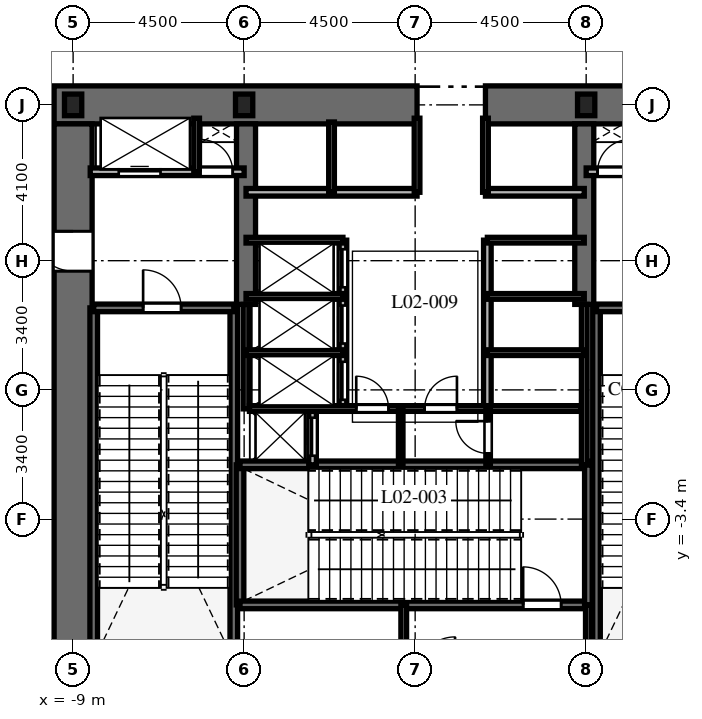
"""IFC4 building model, lengths in metres.
Left out: names, types, materials, properties, quantities, classifications, styles, units other than length and angle.
Written with IfcOpenShell. Run it as: python <this file> out.ifc"""

import sys

from ifc_helpers import new_model, si_unit, direction, frame, frame_2d, origin, origin_2d, place, context, subcontext, project, spatial, rectangle, i_section, extrude, element, fill, save


model = new_model("IFC4")
c1 = context("Model", 3, precision=1e-05, world=origin(), true_north=direction((0.0, 1.0)))
c2 = subcontext(c1, "Body", "Model", "MODEL_VIEW")
j1 = project(units=[si_unit("LENGTHUNIT", "METRE"), si_unit("PLANEANGLEUNIT", "RADIAN")], contexts=[c1])
p1 = place(None, origin())
s1 = spatial("IfcSite", under=j1, at=p1, CompositionType="ELEMENT")
p2 = place(p1, origin())
s2 = spatial("IfcBuilding", under=s1, at=p2, CompositionType="ELEMENT")
p3 = place(p2, frame((0.0, 0.0, 11.4)))
s3 = spatial("IfcBuildingStorey", under=s2, at=p3, CompositionType="ELEMENT", Elevation=11.4)
p4 = place(p3, frame((-9.5, 7.5, 0.0), z_axis=(0.0, 0.0, 1.0), x_axis=(1.0, 0.0, 0.0)))
e1 = element("IfcWall", 1, at=p4, inside=s3, PredefinedType="SHEAR", context=c2, shape_type="SweptSolid", body=[
    extrude(rectangle(XDim=9.55, YDim=1.0, at=frame_2d((4.775, 0.0))), origin(), (0.0, 0.0, 1.0), 7.2),
])
p5 = place(p3, frame((1.85, 7.5, 0.0), z_axis=(0.0, 0.0, 1.0), x_axis=(1.0, 0.0, 0.0)))
e2 = element("IfcWall", 2, at=p5, inside=s3, PredefinedType="SHEAR", context=c2, shape_type="SweptSolid", body=[
    extrude(rectangle(XDim=7.65, YDim=1.0, at=frame_2d((3.825, 0.0))), origin(), (0.0, 0.0, 1.0), 7.2),
])
p6 = place(p3, frame((-9.0, -7.0, 0.0), z_axis=(0.0, 0.0, 1.0), x_axis=(0.0, 1.0, 0.0)))
e3 = element("IfcWall", 3, at=p6, inside=s3, PredefinedType="SHEAR", context=c2, shape_type="SweptSolid", body=[
    extrude(rectangle(XDim=14.0, YDim=1.0, at=frame_2d((7.0, 0.0))), origin(), (0.0, 0.0, 1.0), 7.2),
])
p7 = place(p6, frame((10.125, 0.0, 0.0)))
e4 = element("IfcOpeningElement", 4, at=p7, cuts=e3, PredefinedType="OPENING", context=c2, shape_type="SweptSolid", body=[
    extrude(rectangle(XDim=1.05, YDim=2.15, at=frame_2d((0.525, 1.075))), frame((0.0, 0.51, 0.0), z_axis=(0.0, -1.0, 0.0), x_axis=(1.0, 0.0, 0.0)), (0.0, 0.0, 1.0), 1.02),
])
for number, where, z_axis, x_axis in (
    (5, (-4.45, 2.25, 0.0), (0.0, 0.0, 1.0), (0.0, 1.0, 0.0)),
    (6, (4.45, 2.25, 0.0), (0.0, 0.0, 1.0), (0.0, 1.0, 0.0)),
):
    element("IfcWall", number, at=place(p3, frame(where, z_axis=z_axis, x_axis=x_axis)), inside=s3, PredefinedType="SHEAR", context=c2, shape_type="SweptSolid", body=[
        extrude(rectangle(XDim=4.75, YDim=0.5, at=frame_2d((2.375, 0.0))), origin(), (0.0, 0.0, 1.0), 7.2),
    ])
for number, where, z_axis, x_axis in (
    (7, (-8.458, -6.985, 0.0), (0.0, 0.0, 1.0), (0.0, 1.0, 0.0)),
    (8, (-4.772, -6.985, 0.0), (0.0, 0.0, 1.0), (0.0, 1.0, 0.0)),
):
    element("IfcWall", number, at=place(p3, frame(where, z_axis=z_axis, x_axis=x_axis)), inside=s3, PredefinedType="SHEAR", context=c2, shape_type="SweptSolid", body=[
        extrude(rectangle(XDim=9.143, YDim=0.2, at=frame_2d((4.572, 0.0))), origin(), (0.0, 0.0, 1.0), 7.2),
    ])
p8 = place(p3, frame((-8.458, 2.158, 0.0), z_axis=(0.0, 0.0, 1.0), x_axis=(1.0, 0.0, 0.0)))
e9 = element("IfcWall", 9, at=p8, inside=s3, PredefinedType="SHEAR", context=c2, shape_type="SweptSolid", body=[
    extrude(rectangle(XDim=3.686, YDim=0.2, at=frame_2d((1.843, 0.0))), origin(), (0.0, 0.0, 1.0), 7.2),
])
p9 = place(p8, frame((1.3, 0.0, 0.0)))
e10 = element("IfcOpeningElement", 10, at=p9, cuts=e9, PredefinedType="OPENING", context=c2, shape_type="SweptSolid", body=[
    extrude(rectangle(XDim=1.0, YDim=2.15, at=frame_2d((0.5, 1.075))), frame((0.0, 0.11, 0.0), z_axis=(0.0, -1.0, 0.0), x_axis=(1.0, 0.0, 0.0)), (0.0, 0.0, 1.0), 0.22),
])
p10 = place(p3, frame((4.772, -6.985, 0.0), z_axis=(0.0, 0.0, 1.0), x_axis=(0.0, 1.0, 0.0)))
e11 = element("IfcWall", 11, at=p10, inside=s3, PredefinedType="SHEAR", context=c2, shape_type="SweptSolid", body=[
    extrude(rectangle(XDim=9.143, YDim=0.2, at=frame_2d((4.572, 0.0))), origin(), (0.0, 0.0, 1.0), 7.2),
])
p11 = place(p3, frame((4.772, 2.158, 0.0), z_axis=(0.0, 0.0, 1.0), x_axis=(1.0, 0.0, 0.0)))
e12 = element("IfcWall", 12, at=p11, inside=s3, PredefinedType="SHEAR", context=c2, shape_type="SweptSolid", body=[
    extrude(rectangle(XDim=3.686, YDim=0.2, at=frame_2d((1.843, 0.0))), origin(), (0.0, 0.0, 1.0), 7.2),
])
p12 = place(p11, frame((1.35, 0.0, 0.0)))
e13 = element("IfcOpeningElement", 13, at=p12, cuts=e12, PredefinedType="OPENING", context=c2, shape_type="SweptSolid", body=[
    extrude(rectangle(XDim=1.0, YDim=2.15, at=frame_2d((0.5, 1.075))), frame((0.0, 0.11, 0.0), z_axis=(0.0, -1.0, 0.0), x_axis=(1.0, 0.0, 0.0)), (0.0, 0.0, 1.0), 0.22),
])
p13 = place(p3, frame((-4.608, -5.658, 0.0), z_axis=(0.0, 0.0, 1.0), x_axis=(0.0, 1.0, 0.0)))
e14 = element("IfcWall", 14, at=p13, inside=s3, PredefinedType="SHEAR", context=c2, shape_type="SweptSolid", body=[
    extrude(rectangle(XDim=3.686, YDim=0.2, at=frame_2d((1.843, 0.0))), origin(), (0.0, 0.0, 1.0), 7.2),
])
p14 = place(p3, frame((-4.608, -5.658, 0.0), z_axis=(0.0, 0.0, 1.0), x_axis=(1.0, 0.0, 0.0)))
e15 = element("IfcWall", 15, at=p14, inside=s3, PredefinedType="SHEAR", context=c2, shape_type="SweptSolid", body=[
    extrude(rectangle(XDim=9.166, YDim=0.2, at=frame_2d((4.583, 0.0))), origin(), (0.0, 0.0, 1.0), 7.2),
])
p15 = place(p14, frame((7.45, 0.0, 0.0)))
e16 = element("IfcOpeningElement", 16, at=p15, cuts=e15, PredefinedType="OPENING", context=c2, shape_type="SweptSolid", body=[
    extrude(rectangle(XDim=1.0, YDim=2.15, at=frame_2d((0.5, 1.075))), frame((0.0, 0.11, 0.0), z_axis=(0.0, -1.0, 0.0), x_axis=(1.0, 0.0, 0.0)), (0.0, 0.0, 1.0), 0.22),
])
p16 = place(p3, frame((-4.608, -1.972, 0.0), z_axis=(0.0, 0.0, 1.0), x_axis=(1.0, 0.0, 0.0)))
e17 = element("IfcWall", 17, at=p16, inside=s3, PredefinedType="SHEAR", context=c2, shape_type="SweptSolid", body=[
    extrude(rectangle(XDim=9.166, YDim=0.2, at=frame_2d((4.583, 0.0))), origin(), (0.0, 0.0, 1.0), 7.2),
])
p17 = place(p3, frame((4.558, -5.658, 0.0), z_axis=(0.0, 0.0, 1.0), x_axis=(0.0, 1.0, 0.0)))
e18 = element("IfcWall", 18, at=p17, inside=s3, PredefinedType="SHEAR", context=c2, shape_type="SweptSolid", body=[
    extrude(rectangle(XDim=3.686, YDim=0.2, at=frame_2d((1.843, 0.0))), origin(), (0.0, 0.0, 1.0), 7.2),
])
for number, where, z_axis, x_axis in (
    (19, (4.5, 7.5, 0.0), (0.0, 0.0, 1.0), (1.0, 0.0, 0.0)),
    (20, (-4.5, 7.5, 0.0), (0.0, 0.0, 1.0), (1.0, 0.0, 0.0)),
    (21, (-9.0, 7.5, 0.0), (0.0, 0.0, 1.0), (1.0, 0.0, 0.0)),
):
    element("IfcColumn", number, at=place(p3, frame(where, z_axis=z_axis, x_axis=x_axis)), inside=s3, PredefinedType="COLUMN", context=c2, shape_type="SweptSolid", body=[
        extrude(i_section(OverallWidth=0.454, OverallDepth=0.569, WebThickness=0.078, FlangeThickness=0.125, at=origin_2d()), origin(), (0.0, 0.0, 1.0), 7.2),
    ])
for number, where, z_axis, x_axis in (
    (22, (-0.3, -7.02, 0.0), (0.0, 0.0, 1.0), (0.0, 1.0, 0.0)),
    (23, (4.558, -7.02, 0.0), (0.0, 0.0, 1.0), (0.0, 1.0, 0.0)),
):
    element("IfcWall", number, at=place(p3, frame(where, z_axis=z_axis, x_axis=x_axis)), inside=s3, PredefinedType="PARTITIONING", context=c2, shape_type="SweptSolid", body=[
        extrude(rectangle(XDim=1.362, YDim=0.15, at=frame_2d((0.681, 0.0))), origin(), (0.0, 0.0, 1.0), 6.88),
    ])
p18 = place(p3, frame((-8.55, 5.74, 0.0), z_axis=(0.0, 0.0, 1.0), x_axis=(1.0, 0.0, 0.0)))
e24 = element("IfcWall", 24, at=p18, inside=s3, PredefinedType="PARTITIONING", context=c2, shape_type="SweptSolid", body=[
    extrude(rectangle(XDim=4.05, YDim=0.2, at=frame_2d((2.025, 0.0))), origin(), (0.0, 0.0, 1.0), 6.88),
])
p19 = place(p18, frame((0.75, 0.0, 0.0)))
e25 = element("IfcOpeningElement", 25, at=p19, cuts=e24, PredefinedType="OPENING", context=c2, shape_type="SweptSolid", body=[
    extrude(rectangle(XDim=1.1, YDim=2.2, at=frame_2d((0.55, 1.1))), frame((0.0, 0.11, 0.0), z_axis=(0.0, -1.0, 0.0), x_axis=(1.0, 0.0, 0.0)), (0.0, 0.0, 1.0), 0.22),
])
p20 = place(p18, frame((2.9, 0.0, 0.0)))
e26 = element("IfcOpeningElement", 26, at=p20, cuts=e24, PredefinedType="OPENING", context=c2, shape_type="SweptSolid", body=[
    extrude(rectangle(XDim=0.85, YDim=2.03, at=frame_2d((0.425, 1.015))), frame((0.0, 0.11, 0.0), z_axis=(0.0, -1.0, 0.0), x_axis=(1.0, 0.0, 0.0)), (0.0, 0.0, 1.0), 0.22),
])
p21 = place(p3, frame((-5.75, 5.74, 0.0), z_axis=(0.0, 0.0, 1.0), x_axis=(0.0, 1.0, 0.0)))
e27 = element("IfcWall", 27, at=p21, inside=s3, PredefinedType="PARTITIONING", context=c2, shape_type="SweptSolid", body=[
    extrude(rectangle(XDim=1.41, YDim=0.15, at=frame_2d((0.705, 0.0))), origin(), (0.0, 0.0, 1.0), 6.88),
])
p22 = place(p3, frame((4.5, 5.74, 0.0), z_axis=(0.0, 0.0, 1.0), x_axis=(1.0, 0.0, 0.0)))
e28 = element("IfcWall", 28, at=p22, inside=s3, PredefinedType="PARTITIONING", context=c2, shape_type="SweptSolid", body=[
    extrude(rectangle(XDim=4.05, YDim=0.2, at=frame_2d((2.025, 0.0))), origin(), (0.0, 0.0, 1.0), 6.88),
])
p23 = place(p22, frame((0.3, 0.0, 0.0)))
e29 = element("IfcOpeningElement", 29, at=p23, cuts=e28, PredefinedType="OPENING", context=c2, shape_type="SweptSolid", body=[
    extrude(rectangle(XDim=0.85, YDim=2.03, at=frame_2d((0.425, 1.015))), frame((0.0, 0.11, 0.0), z_axis=(0.0, -1.0, 0.0), x_axis=(1.0, 0.0, 0.0)), (0.0, 0.0, 1.0), 0.22),
])
p24 = place(p22, frame((2.15, 0.0, 0.0)))
e30 = element("IfcOpeningElement", 30, at=p24, cuts=e28, PredefinedType="OPENING", context=c2, shape_type="SweptSolid", body=[
    extrude(rectangle(XDim=1.1, YDim=2.2, at=frame_2d((0.55, 1.1))), frame((0.0, 0.11, 0.0), z_axis=(0.0, -1.0, 0.0), x_axis=(1.0, 0.0, 0.0)), (0.0, 0.0, 1.0), 0.22),
])
p25 = place(p3, frame((-2.7, -1.972, 0.0), z_axis=(0.0, 0.0, 1.0), x_axis=(0.0, 1.0, 0.0)))
e31 = element("IfcWall", 31, at=p25, inside=s3, PredefinedType="PARTITIONING", context=c2, shape_type="SweptSolid", body=[
    extrude(rectangle(XDim=1.472, YDim=0.2, at=frame_2d((0.736, 0.0))), origin(), (0.0, 0.0, 1.0), 6.88),
])
p26 = place(p25, frame((0.24, 0.0, 0.0)))
e32 = element("IfcOpeningElement", 32, at=p26, cuts=e31, PredefinedType="OPENING", context=c2, shape_type="SweptSolid", body=[
    extrude(rectangle(XDim=1.0, YDim=2.2, at=frame_2d((0.5, 1.1))), frame((0.0, 0.11, 0.0), z_axis=(0.0, -1.0, 0.0), x_axis=(1.0, 0.0, 0.0)), (0.0, 0.0, 1.0), 0.22),
])
p27 = place(p3, frame((-4.45, 5.2, 0.0), z_axis=(0.0, 0.0, 1.0), x_axis=(1.0, 0.0, 0.0)))
e33 = element("IfcWall", 33, at=p27, inside=s3, PredefinedType="PARTITIONING", context=c2, shape_type="SweptSolid", body=[
    extrude(rectangle(XDim=4.5, YDim=0.2, at=frame_2d((2.25, 0.0))), origin(), (0.0, 0.0, 1.0), 6.88),
])
p28 = place(p3, frame((1.85, 5.2, 0.0), z_axis=(0.0, 0.0, 1.0), x_axis=(1.0, 0.0, 0.0)))
e34 = element("IfcWall", 34, at=p28, inside=s3, PredefinedType="PARTITIONING", context=c2, shape_type="SweptSolid", body=[
    extrude(rectangle(XDim=2.6, YDim=0.2, at=frame_2d((1.3, 0.0))), origin(), (0.0, 0.0, 1.0), 6.88),
])
p29 = place(p3, frame((-2.2, 5.2, 0.0), z_axis=(0.0, 0.0, 1.0), x_axis=(0.0, 1.0, 0.0)))
e35 = element("IfcWall", 35, at=p29, inside=s3, PredefinedType="PARTITIONING", context=c2, shape_type="SweptSolid", body=[
    extrude(rectangle(XDim=1.85, YDim=0.15, at=frame_2d((0.925, 0.0))), origin(), (0.0, 0.0, 1.0), 6.88),
])
for number, where, z_axis, x_axis in (
    (36, (0.05, 5.2, 0.0), (0.0, 0.0, 1.0), (0.0, 1.0, 0.0)),
    (37, (1.85, 5.2, 0.0), (0.0, 0.0, 1.0), (0.0, 1.0, 0.0)),
):
    element("IfcWall", number, at=place(p3, frame(where, z_axis=z_axis, x_axis=x_axis)), inside=s3, PredefinedType="PARTITIONING", context=c2, shape_type="SweptSolid", body=[
        extrude(rectangle(XDim=1.95, YDim=0.15, at=frame_2d((0.975, 0.0))), origin(), (0.0, 0.0, 1.0), 6.88),
    ])
p30 = place(p3, frame((-4.45, -0.5, 0.0), z_axis=(0.0, 0.0, 1.0), x_axis=(0.0, 1.0, 0.0)))
e38 = element("IfcWall", 38, at=p30, inside=s3, PredefinedType="PARTITIONING", context=c2, shape_type="SweptSolid", body=[
    extrude(rectangle(XDim=2.75, YDim=0.15, at=frame_2d((1.375, 0.0))), origin(), (0.0, 0.0, 1.0), 6.88),
])
p31 = place(p3, frame((4.45, -1.972, 0.0), z_axis=(0.0, 0.0, 1.0), x_axis=(0.0, 1.0, 0.0)))
e39 = element("IfcWall", 39, at=p31, inside=s3, PredefinedType="PARTITIONING", context=c2, shape_type="SweptSolid", body=[
    extrude(rectangle(XDim=4.222, YDim=0.15, at=frame_2d((2.111, 0.0))), origin(), (0.0, 0.0, 1.0), 6.88),
])
p32 = place(p3, frame((-1.9, -0.5, 0.0), z_axis=(0.0, 0.0, 1.0), x_axis=(0.0, 1.0, 0.0)))
e40 = element("IfcWall", 40, at=p32, inside=s3, PredefinedType="PARTITIONING", context=c2, shape_type="SweptSolid", body=[
    extrude(rectangle(XDim=4.44, YDim=0.2, at=frame_2d((2.22, 0.0))), origin(), (0.0, 0.0, 1.0), 6.88),
])
p33 = place(p32, frame((0.24, 0.0, 0.0)))
e41 = element("IfcOpeningElement", 41, at=p33, cuts=e40, PredefinedType="OPENING", context=c2, shape_type="SweptSolid", body=[
    extrude(rectangle(XDim=1.0, YDim=2.2, at=frame_2d((0.5, 1.1))), frame((0.0, 0.11, 0.0), z_axis=(0.0, -1.0, 0.0), x_axis=(1.0, 0.0, 0.0)), (0.0, 0.0, 1.0), 0.22),
])
p34 = place(p32, frame((1.72, 0.0, 0.0)))
e42 = element("IfcOpeningElement", 42, at=p34, cuts=e40, PredefinedType="OPENING", context=c2, shape_type="SweptSolid", body=[
    extrude(rectangle(XDim=1.0, YDim=2.2, at=frame_2d((0.5, 1.1))), frame((0.0, 0.11, 0.0), z_axis=(0.0, -1.0, 0.0), x_axis=(1.0, 0.0, 0.0)), (0.0, 0.0, 1.0), 0.22),
])
p35 = place(p32, frame((3.2, 0.0, 0.0)))
e43 = element("IfcOpeningElement", 43, at=p35, cuts=e40, PredefinedType="OPENING", context=c2, shape_type="SweptSolid", body=[
    extrude(rectangle(XDim=1.0, YDim=2.2, at=frame_2d((0.5, 1.1))), frame((0.0, 0.11, 0.0), z_axis=(0.0, -1.0, 0.0), x_axis=(1.0, 0.0, 0.0)), (0.0, 0.0, 1.0), 0.22),
])
for number, where, z_axis, x_axis in (
    (44, (-4.45, 3.94, 0.0), (0.0, 0.0, 1.0), (1.0, 0.0, 0.0)),
    (45, (-4.45, 0.98, 0.0), (0.0, 0.0, 1.0), (1.0, 0.0, 0.0)),
    (46, (-4.45, 2.46, 0.0), (0.0, 0.0, 1.0), (1.0, 0.0, 0.0)),
):
    element("IfcWall", number, at=place(p3, frame(where, z_axis=z_axis, x_axis=x_axis)), inside=s3, PredefinedType="PARTITIONING", context=c2, shape_type="SweptSolid", body=[
        extrude(rectangle(XDim=2.55, YDim=0.15, at=frame_2d((1.275, 0.0))), origin(), (0.0, 0.0, 1.0), 6.88),
    ])
p36 = place(p3, frame((1.9, -0.5, 0.0), z_axis=(0.0, 0.0, 1.0), x_axis=(0.0, 1.0, 0.0)))
e47 = element("IfcWall", 47, at=p36, inside=s3, PredefinedType="PARTITIONING", context=c2, shape_type="SweptSolid", body=[
    extrude(rectangle(XDim=4.44, YDim=0.2, at=frame_2d((2.22, 0.0))), origin(), (0.0, 0.0, 1.0), 6.88),
])
for number, where, z_axis, x_axis in (
    (48, (1.9, 3.94, 0.0), (0.0, 0.0, 1.0), (1.0, 0.0, 0.0)),
    (49, (1.9, 0.98, 0.0), (0.0, 0.0, 1.0), (1.0, 0.0, 0.0)),
    (50, (1.9, 2.46, 0.0), (0.0, 0.0, 1.0), (1.0, 0.0, 0.0)),
):
    element("IfcWall", number, at=place(p3, frame(where, z_axis=z_axis, x_axis=x_axis)), inside=s3, PredefinedType="PARTITIONING", context=c2, shape_type="SweptSolid", body=[
        extrude(rectangle(XDim=2.55, YDim=0.15, at=frame_2d((1.275, 0.0))), origin(), (0.0, 0.0, 1.0), 6.88),
    ])
p37 = place(p3, frame((-4.36, -0.49, 0.0), z_axis=(0.0, 0.0, 1.0), x_axis=(1.0, 0.0, 0.0)))
e51 = element("IfcWall", 51, at=p37, inside=s3, PredefinedType="PARTITIONING", context=c2, shape_type="SweptSolid", body=[
    extrude(rectangle(XDim=8.72, YDim=0.15, at=frame_2d((4.36, 0.0))), origin(), (0.0, 0.0, 1.0), 6.88),
])
p38 = place(p37, frame((2.81, 0.0, 0.0)))
e52 = element("IfcOpeningElement", 52, at=p38, cuts=e51, PredefinedType="OPENING", context=c2, shape_type="SweptSolid", body=[
    extrude(rectangle(XDim=0.85, YDim=2.03, at=frame_2d((0.425, 1.015))), frame((0.0, 0.085, 0.0), z_axis=(0.0, -1.0, 0.0), x_axis=(1.0, 0.0, 0.0)), (0.0, 0.0, 1.0), 0.17),
])
p39 = place(p37, frame((4.61, 0.0, 0.0)))
e53 = element("IfcOpeningElement", 53, at=p39, cuts=e51, PredefinedType="OPENING", context=c2, shape_type="SweptSolid", body=[
    extrude(rectangle(XDim=0.85, YDim=2.03, at=frame_2d((0.425, 1.015))), frame((0.0, 0.085, 0.0), z_axis=(0.0, -1.0, 0.0), x_axis=(1.0, 0.0, 0.0)), (0.0, 0.0, 1.0), 0.17),
])
p40 = place(p3, frame((-0.38, -1.972, 0.0), z_axis=(0.0, 0.0, 1.0), x_axis=(0.0, 1.0, 0.0)))
e54 = element("IfcWall", 54, at=p40, inside=s3, PredefinedType="PARTITIONING", context=c2, shape_type="SweptSolid", body=[
    extrude(rectangle(XDim=1.472, YDim=0.12, at=frame_2d((0.736, 0.0))), origin(), (0.0, 0.0, 1.0), 6.88),
])
p41 = place(p3, frame((1.92, -1.972, 0.0), z_axis=(0.0, 0.0, 1.0), x_axis=(0.0, 1.0, 0.0)))
e55 = element("IfcWall", 55, at=p41, inside=s3, PredefinedType="PARTITIONING", context=c2, shape_type="SweptSolid", body=[
    extrude(rectangle(XDim=1.472, YDim=0.12, at=frame_2d((0.736, 0.0))), origin(), (0.0, 0.0, 1.0), 6.88),
])
p42 = place(p41, frame((0.3, 0.0, 0.0)))
e56 = element("IfcOpeningElement", 56, at=p42, cuts=e55, PredefinedType="OPENING", context=c2, shape_type="SweptSolid", body=[
    extrude(rectangle(XDim=0.85, YDim=2.03, at=frame_2d((0.425, 1.015))), frame((0.0, 0.07, 0.0), z_axis=(0.0, -1.0, 0.0), x_axis=(1.0, 0.0, 0.0)), (0.0, 0.0, 1.0), 0.14),
])
p43 = place(p9, origin())
e57 = element("IfcDoor", 57, at=p43, inside=s3, OperationType="SINGLE_SWING_LEFT", PredefinedType="DOOR", context=c2, shape_type="SweptSolid", body=[
    extrude(rectangle(XDim=1.0, YDim=2.15, at=frame_2d((0.5, 1.075))), frame((0.0, 0.025, 0.0), z_axis=(0.0, -1.0, 0.0), x_axis=(1.0, 0.0, 0.0)), (0.0, 0.0, 1.0), 0.05),
])
fill(e10, e57)
p44 = place(p15, origin())
e58 = element("IfcDoor", 58, at=p44, inside=s3, OperationType="SINGLE_SWING_LEFT", PredefinedType="DOOR", context=c2, shape_type="SweptSolid", body=[
    extrude(rectangle(XDim=1.0, YDim=2.15, at=frame_2d((0.5, 1.075))), frame((0.0, 0.025, 0.0), z_axis=(0.0, -1.0, 0.0), x_axis=(1.0, 0.0, 0.0)), (0.0, 0.0, 1.0), 0.05),
])
fill(e16, e58)
p45 = place(p7, origin())
e59 = element("IfcDoor", 59, at=p45, inside=s3, OperationType="SINGLE_SWING_RIGHT", PredefinedType="DOOR", context=c2, shape_type="SweptSolid", body=[
    extrude(rectangle(XDim=1.05, YDim=2.15, at=frame_2d((0.525, 1.075))), frame((0.0, 0.025, 0.0), z_axis=(0.0, -1.0, 0.0), x_axis=(1.0, 0.0, 0.0)), (0.0, 0.0, 1.0), 0.05),
])
fill(e4, e59)
p46 = place(p19, origin())
e60 = element("IfcDoor", 60, at=p46, inside=s3, OperationType="SLIDING_TO_LEFT", PredefinedType="DOOR", context=c2, shape_type="SweptSolid", body=[
    extrude(rectangle(XDim=1.1, YDim=2.2, at=frame_2d((0.55, 1.1))), frame((0.0, 0.025, 0.0), z_axis=(0.0, -1.0, 0.0), x_axis=(1.0, 0.0, 0.0)), (0.0, 0.0, 1.0), 0.05),
])
fill(e25, e60)
p47 = place(p20, origin())
e61 = element("IfcDoor", 61, at=p47, inside=s3, OperationType="SINGLE_SWING_LEFT", PredefinedType="DOOR", context=c2, shape_type="SweptSolid", body=[
    extrude(rectangle(XDim=0.85, YDim=2.03, at=frame_2d((0.425, 1.015))), frame((0.0, 0.025, 0.0), z_axis=(0.0, -1.0, 0.0), x_axis=(1.0, 0.0, 0.0)), (0.0, 0.0, 1.0), 0.05),
])
fill(e26, e61)
p48 = place(p23, origin())
e62 = element("IfcDoor", 62, at=p48, inside=s3, OperationType="SINGLE_SWING_RIGHT", PredefinedType="DOOR", context=c2, shape_type="SweptSolid", body=[
    extrude(rectangle(XDim=0.85, YDim=2.03, at=frame_2d((0.425, 1.015))), frame((0.0, 0.025, 0.0), z_axis=(0.0, -1.0, 0.0), x_axis=(1.0, 0.0, 0.0)), (0.0, 0.0, 1.0), 0.05),
])
fill(e29, e62)
p49 = place(p26, origin())
e63 = element("IfcDoor", 63, at=p49, inside=s3, OperationType="SLIDING_TO_LEFT", PredefinedType="DOOR", context=c2, shape_type="SweptSolid", body=[
    extrude(rectangle(XDim=1.0, YDim=2.2, at=frame_2d((0.5, 1.1))), frame((0.0, 0.025, 0.0), z_axis=(0.0, -1.0, 0.0), x_axis=(1.0, 0.0, 0.0)), (0.0, 0.0, 1.0), 0.05),
])
fill(e32, e63)
p50 = place(p33, origin())
e64 = element("IfcDoor", 64, at=p50, inside=s3, OperationType="SLIDING_TO_LEFT", PredefinedType="DOOR", context=c2, shape_type="SweptSolid", body=[
    extrude(rectangle(XDim=1.0, YDim=2.2, at=frame_2d((0.5, 1.1))), frame((0.0, 0.025, 0.0), z_axis=(0.0, -1.0, 0.0), x_axis=(1.0, 0.0, 0.0)), (0.0, 0.0, 1.0), 0.05),
])
fill(e41, e64)
p51 = place(p34, origin())
e65 = element("IfcDoor", 65, at=p51, inside=s3, OperationType="SLIDING_TO_LEFT", PredefinedType="DOOR", context=c2, shape_type="SweptSolid", body=[
    extrude(rectangle(XDim=1.0, YDim=2.2, at=frame_2d((0.5, 1.1))), frame((0.0, 0.025, 0.0), z_axis=(0.0, -1.0, 0.0), x_axis=(1.0, 0.0, 0.0)), (0.0, 0.0, 1.0), 0.05),
])
fill(e42, e65)
p52 = place(p35, origin())
e66 = element("IfcDoor", 66, at=p52, inside=s3, OperationType="SLIDING_TO_LEFT", PredefinedType="DOOR", context=c2, shape_type="SweptSolid", body=[
    extrude(rectangle(XDim=1.0, YDim=2.2, at=frame_2d((0.5, 1.1))), frame((0.0, 0.025, 0.0), z_axis=(0.0, -1.0, 0.0), x_axis=(1.0, 0.0, 0.0)), (0.0, 0.0, 1.0), 0.05),
])
fill(e43, e66)
p53 = place(p38, origin())
e67 = element("IfcDoor", 67, at=p53, inside=s3, OperationType="SINGLE_SWING_LEFT", PredefinedType="DOOR", context=c2, shape_type="SweptSolid", body=[
    extrude(rectangle(XDim=0.85, YDim=2.03, at=frame_2d((0.425, 1.015))), frame((0.0, 0.025, 0.0), z_axis=(0.0, -1.0, 0.0), x_axis=(1.0, 0.0, 0.0)), (0.0, 0.0, 1.0), 0.05),
])
fill(e52, e67)
p54 = place(p39, origin())
e68 = element("IfcDoor", 68, at=p54, inside=s3, OperationType="SINGLE_SWING_RIGHT", PredefinedType="DOOR", context=c2, shape_type="SweptSolid", body=[
    extrude(rectangle(XDim=0.85, YDim=2.03, at=frame_2d((0.425, 1.015))), frame((0.0, 0.025, 0.0), z_axis=(0.0, -1.0, 0.0), x_axis=(1.0, 0.0, 0.0)), (0.0, 0.0, 1.0), 0.05),
])
fill(e53, e68)
p55 = place(p42, origin())
e69 = element("IfcDoor", 69, at=p55, inside=s3, OperationType="SINGLE_SWING_RIGHT", PredefinedType="DOOR", context=c2, shape_type="SweptSolid", body=[
    extrude(rectangle(XDim=0.85, YDim=2.03, at=frame_2d((0.425, 1.015))), frame((0.0, 0.025, 0.0), z_axis=(0.0, -1.0, 0.0), x_axis=(1.0, 0.0, 0.0)), (0.0, 0.0, 1.0), 0.05),
])
fill(e56, e69)
save(model, sys.argv[1])
